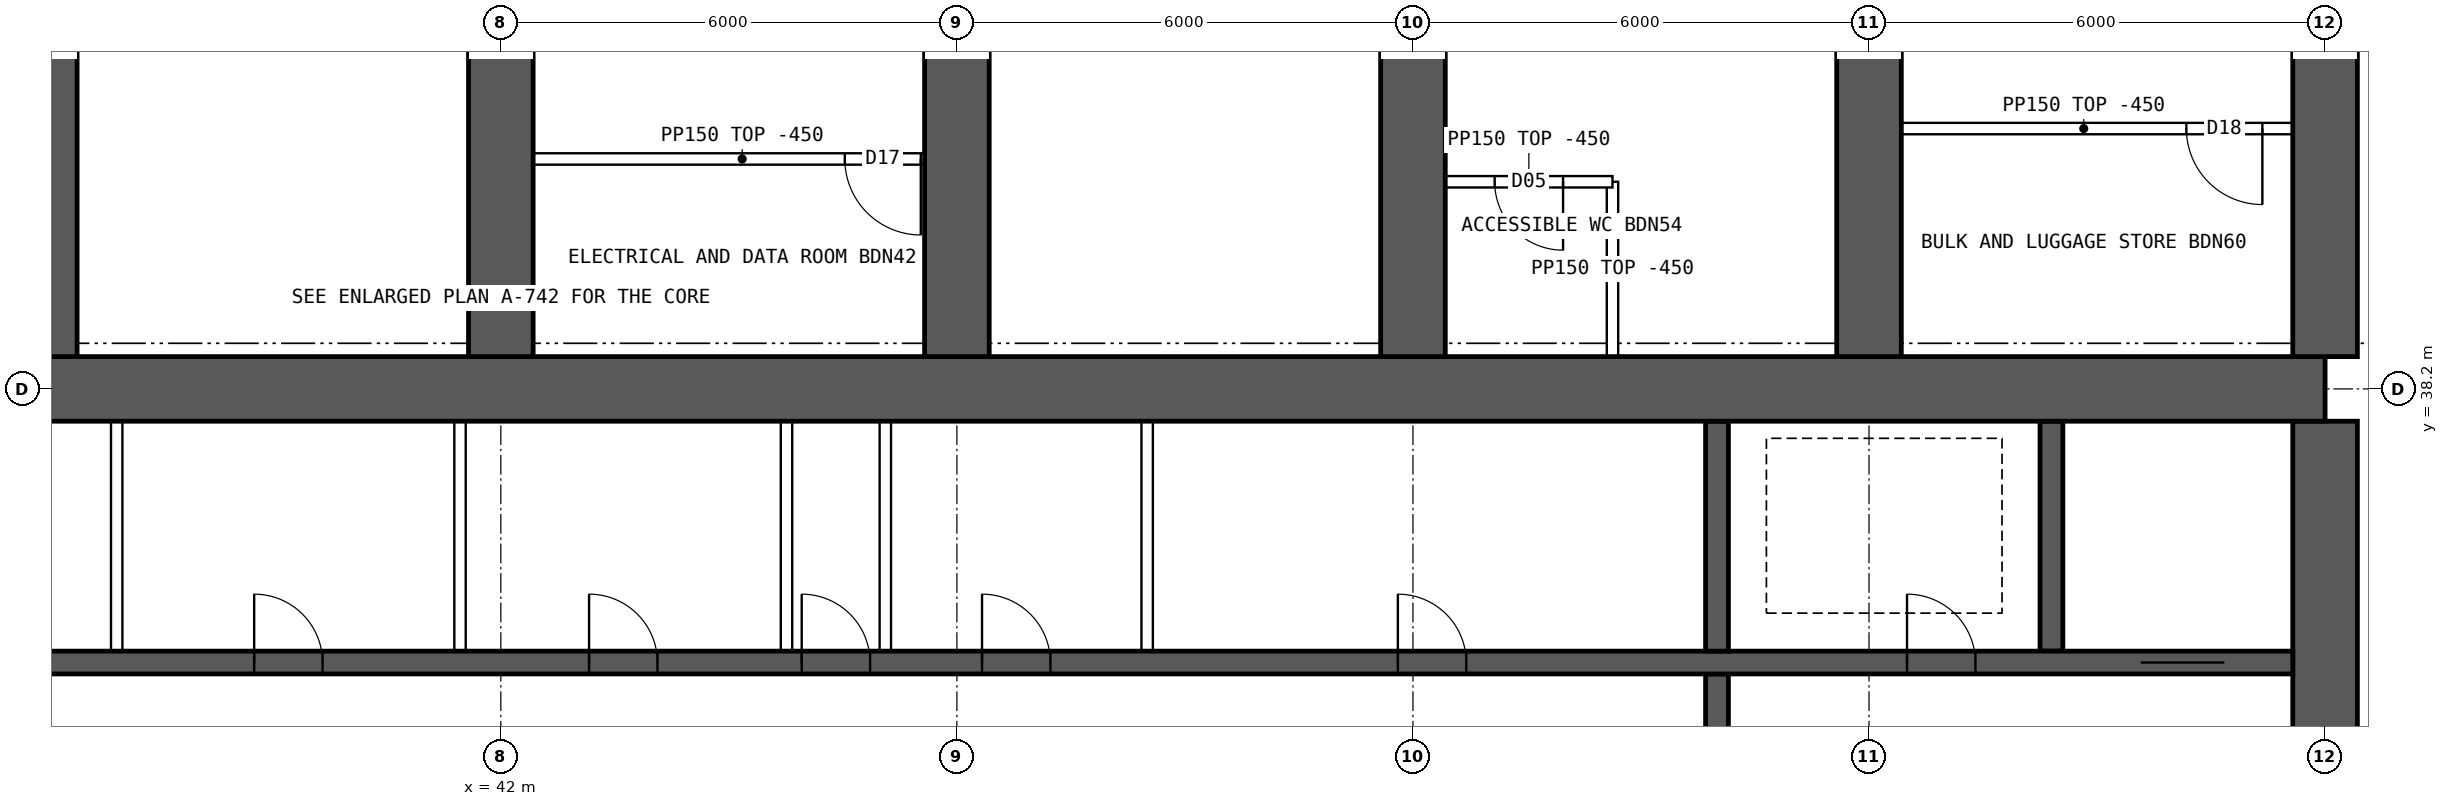
"""IFC4 building model, lengths in metres.
Left out: names, types, materials, properties, quantities, classifications, styles, units other than length and angle.
Written with IfcOpenShell. Run it as: python <this file> out.ifc"""

import sys

from ifc_helpers import new_model, si_unit, direction, frame, frame_2d, origin, place, context, subcontext, project, spatial, rectangle, extrude, element, fill, save


model = new_model("IFC4")
c1 = context("Model", 3, precision=1e-05, world=origin(), true_north=direction((0.0, 1.0)))
c2 = subcontext(c1, "Body", "Model", "MODEL_VIEW")
j1 = project(units=[si_unit("LENGTHUNIT", "METRE"), si_unit("PLANEANGLEUNIT", "RADIAN")], contexts=[c1])
p1 = place(None, origin())
s1 = spatial("IfcSite", under=j1, at=p1, CompositionType="ELEMENT")
p2 = place(p1, origin())
s2 = spatial("IfcBuilding", under=s1, at=p2, CompositionType="ELEMENT")
p3 = place(p2, frame((0.0, 0.0, 159.85)))
s3 = spatial("IfcBuildingStorey", under=s2, at=p3, CompositionType="ELEMENT", Elevation=159.85)
p4 = place(p3, frame((18.0, 38.2, 0.0), z_axis=(0.0, 0.0, 1.0), x_axis=(1.0, 0.0, 0.0)))
e1 = element("IfcWall", 1, at=p4, inside=s3, PredefinedType="SHEAR", context=c2, shape_type="SweptSolid", body=[
    extrude(rectangle(XDim=48.0, YDim=0.85, at=frame_2d((24.0, 0.0))), origin(), (0.0, 0.0, 1.0), 3.75),
])
p5 = place(p3, frame((66.0, 26.225, 0.0), z_axis=(0.0, 0.0, 1.0), x_axis=(0.0, 1.0, 0.0)))
e2 = element("IfcWall", 2, at=p5, inside=s3, PredefinedType="SHEAR", context=c2, shape_type="SweptSolid", body=[
    extrude(rectangle(XDim=11.55, YDim=0.85, at=frame_2d((5.775, 0.0))), origin(), (0.0, 0.0, 1.0), 3.75),
])
p6 = place(p5, frame((5.075, 0.0, 0.0)))
e3 = element("IfcOpeningElement", 3, at=p6, cuts=e2, PredefinedType="OPENING", context=c2, shape_type="SweptSolid", body=[
    extrude(rectangle(XDim=1.2, YDim=2.1, at=frame_2d((0.6, 1.05))), frame((0.0, 0.435, 0.0), z_axis=(0.0, -1.0, 0.0), x_axis=(1.0, 0.0, 0.0)), (0.0, 0.0, 1.0), 0.87),
])
p7 = place(p3, frame((18.425, 34.6, 0.0), z_axis=(0.0, 0.0, 1.0), x_axis=(1.0, 0.0, 0.0)))
e4 = element("IfcWall", 4, at=p7, inside=s3, PredefinedType="SHEAR", context=c2, shape_type="SweptSolid", body=[
    extrude(rectangle(XDim=47.15, YDim=0.3, at=frame_2d((23.575, 0.0))), origin(), (0.0, 0.0, 1.0), 3.75),
])
p8 = place(p7, frame((0.9, 0.0, 0.0)))
e5 = element("IfcOpeningElement", 5, at=p8, cuts=e4, PredefinedType="OPENING", context=c2, shape_type="SweptSolid", body=[
    extrude(rectangle(XDim=1.1, YDim=2.1, at=frame_2d((0.55, 1.05))), frame((0.0, 0.16, 0.0), z_axis=(0.0, -1.0, 0.0), x_axis=(1.0, 0.0, 0.0)), (0.0, 0.0, 1.0), 0.32),
])
p9 = place(p7, frame((45.15, 0.0, 0.0)))
e6 = element("IfcOpeningElement", 6, at=p9, cuts=e4, PredefinedType="OPENING", context=c2, shape_type="SweptSolid", body=[
    extrude(rectangle(XDim=1.1, YDim=2.1, at=frame_2d((0.55, 1.05))), frame((0.0, 0.16, 0.0), z_axis=(0.0, -1.0, 0.0), x_axis=(1.0, 0.0, 0.0)), (0.0, 0.0, 1.0), 0.32),
])
p10 = place(p7, frame((4.175, 0.0, 0.0)))
e7 = element("IfcOpeningElement", 7, at=p10, cuts=e4, PredefinedType="OPENING", context=c2, shape_type="SweptSolid", body=[
    extrude(rectangle(XDim=0.9, YDim=2.1, at=frame_2d((0.45, 1.05))), frame((0.0, 0.16, 0.0), z_axis=(0.0, -1.0, 0.0), x_axis=(1.0, 0.0, 0.0)), (0.0, 0.0, 1.0), 0.32),
])
p11 = place(p7, frame((42.075, 0.0, 0.0)))
e8 = element("IfcOpeningElement", 8, at=p11, cuts=e4, PredefinedType="OPENING", context=c2, shape_type="SweptSolid", body=[
    extrude(rectangle(XDim=0.9, YDim=2.1, at=frame_2d((0.45, 1.05))), frame((0.0, 0.16, 0.0), z_axis=(0.0, -1.0, 0.0), x_axis=(1.0, 0.0, 0.0)), (0.0, 0.0, 1.0), 0.32),
])
p12 = place(p7, frame((8.95, 0.0, 0.0)))
e9 = element("IfcOpeningElement", 9, at=p12, cuts=e4, PredefinedType="OPENING", context=c2, shape_type="SweptSolid", body=[
    extrude(rectangle(XDim=0.9, YDim=2.1, at=frame_2d((0.45, 1.05))), frame((0.0, 0.16, 0.0), z_axis=(0.0, -1.0, 0.0), x_axis=(1.0, 0.0, 0.0)), (0.0, 0.0, 1.0), 0.32),
])
p13 = place(p7, frame((12.924, 0.0, 0.0)))
e10 = element("IfcOpeningElement", 10, at=p13, cuts=e4, PredefinedType="OPENING", context=c2, shape_type="SweptSolid", body=[
    extrude(rectangle(XDim=0.9, YDim=2.1, at=frame_2d((0.45, 1.05))), frame((0.0, 0.16, 0.0), z_axis=(0.0, -1.0, 0.0), x_axis=(1.0, 0.0, 0.0)), (0.0, 0.0, 1.0), 0.32),
])
p14 = place(p7, frame((16.571, 0.0, 0.0)))
e11 = element("IfcOpeningElement", 11, at=p14, cuts=e4, PredefinedType="OPENING", context=c2, shape_type="SweptSolid", body=[
    extrude(rectangle(XDim=0.9, YDim=2.1, at=frame_2d((0.45, 1.05))), frame((0.0, 0.16, 0.0), z_axis=(0.0, -1.0, 0.0), x_axis=(1.0, 0.0, 0.0)), (0.0, 0.0, 1.0), 0.32),
])
p15 = place(p7, frame((20.33, 0.0, 0.0)))
e12 = element("IfcOpeningElement", 12, at=p15, cuts=e4, PredefinedType="OPENING", context=c2, shape_type="SweptSolid", body=[
    extrude(rectangle(XDim=0.9, YDim=2.1, at=frame_2d((0.45, 1.05))), frame((0.0, 0.16, 0.0), z_axis=(0.0, -1.0, 0.0), x_axis=(1.0, 0.0, 0.0)), (0.0, 0.0, 1.0), 0.32),
])
p16 = place(p7, frame((24.736, 0.0, 0.0)))
e13 = element("IfcOpeningElement", 13, at=p16, cuts=e4, PredefinedType="OPENING", context=c2, shape_type="SweptSolid", body=[
    extrude(rectangle(XDim=0.9, YDim=2.1, at=frame_2d((0.45, 1.05))), frame((0.0, 0.16, 0.0), z_axis=(0.0, -1.0, 0.0), x_axis=(1.0, 0.0, 0.0)), (0.0, 0.0, 1.0), 0.32),
])
p17 = place(p7, frame((27.533, 0.0, 0.0)))
e14 = element("IfcOpeningElement", 14, at=p17, cuts=e4, PredefinedType="OPENING", context=c2, shape_type="SweptSolid", body=[
    extrude(rectangle(XDim=0.9, YDim=2.1, at=frame_2d((0.45, 1.05))), frame((0.0, 0.16, 0.0), z_axis=(0.0, -1.0, 0.0), x_axis=(1.0, 0.0, 0.0)), (0.0, 0.0, 1.0), 0.32),
])
p18 = place(p7, frame((29.906, 0.0, 0.0)))
e15 = element("IfcOpeningElement", 15, at=p18, cuts=e4, PredefinedType="OPENING", context=c2, shape_type="SweptSolid", body=[
    extrude(rectangle(XDim=0.9, YDim=2.1, at=frame_2d((0.45, 1.05))), frame((0.0, 0.16, 0.0), z_axis=(0.0, -1.0, 0.0), x_axis=(1.0, 0.0, 0.0)), (0.0, 0.0, 1.0), 0.32),
])
p19 = place(p7, frame((35.376, 0.0, 0.0)))
e16 = element("IfcOpeningElement", 16, at=p19, cuts=e4, PredefinedType="OPENING", context=c2, shape_type="SweptSolid", body=[
    extrude(rectangle(XDim=0.9, YDim=2.1, at=frame_2d((0.45, 1.05))), frame((0.0, 0.16, 0.0), z_axis=(0.0, -1.0, 0.0), x_axis=(1.0, 0.0, 0.0)), (0.0, 0.0, 1.0), 0.32),
])
p20 = place(p3, frame((58.0, 30.55, 0.0), z_axis=(0.0, 0.0, 1.0), x_axis=(0.0, 1.0, 0.0)))
e17 = element("IfcWall", 17, at=p20, inside=s3, PredefinedType="SHEAR", context=c2, shape_type="SweptSolid", body=[
    extrude(rectangle(XDim=3.9, YDim=0.3, at=frame_2d((1.95, 0.0))), origin(), (0.0, 0.0, 1.0), 3.75),
])
p21 = place(p20, frame((1.4, 0.0, 0.0)))
e18 = element("IfcOpeningElement", 18, at=p21, cuts=e17, PredefinedType="OPENING", context=c2, shape_type="SweptSolid", body=[
    extrude(rectangle(XDim=1.2, YDim=2.1, at=frame_2d((0.6, 1.05))), frame((0.0, 0.16, 0.0), z_axis=(0.0, -1.0, 0.0), x_axis=(1.0, 0.0, 0.0)), (0.0, 0.0, 1.0), 0.32),
])
for number, where, z_axis, x_axis in (
    (19, (62.4, 34.75, 0.0), (0.0, 0.0, 1.0), (0.0, 1.0, 0.0)),
    (20, (58.0, 34.75, 0.0), (0.0, 0.0, 1.0), (0.0, 1.0, 0.0)),
):
    element("IfcWall", number, at=place(p3, frame(where, z_axis=z_axis, x_axis=x_axis)), inside=s3, PredefinedType="SHEAR", context=c2, shape_type="SweptSolid", body=[
        extrude(rectangle(XDim=3.025, YDim=0.3, at=frame_2d((1.512, 0.0))), origin(), (0.0, 0.0, 1.0), 3.75),
    ])
for number, where, z_axis, x_axis in (
    (21, (36.0, 38.625, 0.0), (0.0, 0.0, 1.0), (0.0, 1.0, 0.0)),
    (22, (42.0, 38.625, 0.0), (0.0, 0.0, 1.0), (0.0, 1.0, 0.0)),
    (23, (48.0, 38.625, 0.0), (0.0, 0.0, 1.0), (0.0, 1.0, 0.0)),
    (24, (54.0, 38.625, 0.0), (0.0, 0.0, 1.0), (0.0, 1.0, 0.0)),
    (25, (60.0, 38.625, 0.0), (0.0, 0.0, 1.0), (0.0, 1.0, 0.0)),
    (26, (66.0, 38.625, 0.0), (0.0, 0.0, 1.0), (0.0, 1.0, 0.0)),
):
    element("IfcWall", number, at=place(p3, frame(where, z_axis=z_axis, x_axis=x_axis)), inside=s3, PredefinedType="SHEAR", context=c2, shape_type="SweptSolid", body=[
        extrude(rectangle(XDim=8.175, YDim=0.85, at=frame_2d((4.087, 0.0))), origin(), (0.0, 0.0, 1.0), 3.75),
    ])
for number, where, z_axis, x_axis in (
    (27, (36.946, 34.75, 0.0), (0.0, 0.0, 1.0), (0.0, 1.0, 0.0)),
    (28, (41.463, 34.75, 0.0), (0.0, 0.0, 1.0), (0.0, 1.0, 0.0)),
    (29, (45.758, 34.75, 0.0), (0.0, 0.0, 1.0), (0.0, 1.0, 0.0)),
    (30, (47.058, 34.75, 0.0), (0.0, 0.0, 1.0), (0.0, 1.0, 0.0)),
    (31, (50.503, 34.75, 0.0), (0.0, 0.0, 1.0), (0.0, 1.0, 0.0)),
):
    element("IfcWall", number, at=place(p3, frame(where, z_axis=z_axis, x_axis=x_axis)), inside=s3, PredefinedType="SOLIDWALL", context=c2, shape_type="SweptSolid", body=[
        extrude(rectangle(XDim=3.025, YDim=0.15, at=frame_2d((1.512, 0.0))), origin(), (0.0, 0.0, 1.0), 3.3),
    ])
p22 = place(p3, frame((47.925, 41.225, 0.0), z_axis=(0.0, 0.0, 1.0), x_axis=(-1.0, 0.0, 0.0)))
e32 = element("IfcWall", 32, at=p22, inside=s3, PredefinedType="PARTITIONING", context=c2, shape_type="SweptSolid", body=[
    extrude(rectangle(XDim=5.5, YDim=0.15, at=frame_2d((2.75, 0.0))), origin(), (0.0, 0.0, 1.0), 3.3),
])
p23 = place(p22, frame((0.4, 0.0, 0.0)))
e33 = element("IfcOpeningElement", 33, at=p23, cuts=e32, PredefinedType="OPENING", context=c2, shape_type="SweptSolid", body=[
    extrude(rectangle(XDim=1.0, YDim=2.1, at=frame_2d((0.5, 1.05))), frame((0.0, 0.085, 0.0), z_axis=(0.0, -1.0, 0.0), x_axis=(1.0, 0.0, 0.0)), (0.0, 0.0, 1.0), 0.17),
])
p24 = place(p3, frame((56.625, 40.925, 0.0), z_axis=(0.0, 0.0, 1.0), x_axis=(0.0, -1.0, 0.0)))
e34 = element("IfcWall", 34, at=p24, inside=s3, PredefinedType="PARTITIONING", context=c2, shape_type="SweptSolid", body=[
    extrude(rectangle(XDim=2.3, YDim=0.15, at=frame_2d((1.15, 0.0))), origin(), (0.0, 0.0, 1.0), 3.3),
])
p25 = place(p3, frame((56.625, 40.925, 0.0), z_axis=(0.0, 0.0, 1.0), x_axis=(-1.0, 0.0, 0.0)))
e35 = element("IfcWall", 35, at=p25, inside=s3, PredefinedType="PARTITIONING", context=c2, shape_type="SweptSolid", body=[
    extrude(rectangle(XDim=2.2, YDim=0.15, at=frame_2d((1.1, 0.0))), origin(), (0.0, 0.0, 1.0), 3.3),
])
p26 = place(p25, frame((0.65, 0.0, 0.0)))
e36 = element("IfcOpeningElement", 36, at=p26, cuts=e35, PredefinedType="OPENING", context=c2, shape_type="SweptSolid", body=[
    extrude(rectangle(XDim=0.9, YDim=2.1, at=frame_2d((0.45, 1.05))), frame((0.0, 0.085, 0.0), z_axis=(0.0, -1.0, 0.0), x_axis=(1.0, 0.0, 0.0)), (0.0, 0.0, 1.0), 0.17),
])
p27 = place(p3, frame((65.575, 41.625, 0.0), z_axis=(0.0, 0.0, 1.0), x_axis=(-1.0, 0.0, 0.0)))
e37 = element("IfcWall", 37, at=p27, inside=s3, PredefinedType="PARTITIONING", context=c2, shape_type="SweptSolid", body=[
    extrude(rectangle(XDim=5.5, YDim=0.15, at=frame_2d((2.75, 0.0))), origin(), (0.0, 0.0, 1.0), 3.3),
])
p28 = place(p27, frame((0.4, 0.0, 0.0)))
e38 = element("IfcOpeningElement", 38, at=p28, cuts=e37, PredefinedType="OPENING", context=c2, shape_type="SweptSolid", body=[
    extrude(rectangle(XDim=1.0, YDim=2.1, at=frame_2d((0.5, 1.05))), frame((0.0, 0.085, 0.0), z_axis=(0.0, -1.0, 0.0), x_axis=(1.0, 0.0, 0.0)), (0.0, 0.0, 1.0), 0.17),
])
p29 = place(p9, origin())
e39 = element("IfcDoor", 39, at=p29, inside=s3, OperationType="DOUBLE_DOOR_SLIDING", PredefinedType="DOOR", context=c2, shape_type="SweptSolid", body=[
    extrude(rectangle(XDim=1.1, YDim=2.1, at=frame_2d((0.55, 1.05))), frame((0.0, 0.025, 0.0), z_axis=(0.0, -1.0, 0.0), x_axis=(1.0, 0.0, 0.0)), (0.0, 0.0, 1.0), 0.05),
])
fill(e6, e39)
p30 = place(p11, origin())
e40 = element("IfcDoor", 40, at=p30, inside=s3, OperationType="SINGLE_SWING_LEFT", PredefinedType="DOOR", context=c2, shape_type="SweptSolid", body=[
    extrude(rectangle(XDim=0.9, YDim=2.1, at=frame_2d((0.45, 1.05))), frame((0.0, 0.025, 0.0), z_axis=(0.0, -1.0, 0.0), x_axis=(1.0, 0.0, 0.0)), (0.0, 0.0, 1.0), 0.05),
])
fill(e8, e40)
p31 = place(p15, origin())
e41 = element("IfcDoor", 41, at=p31, inside=s3, OperationType="SINGLE_SWING_LEFT", PredefinedType="DOOR", context=c2, shape_type="SweptSolid", body=[
    extrude(rectangle(XDim=0.9, YDim=2.1, at=frame_2d((0.45, 1.05))), frame((0.0, 0.025, 0.0), z_axis=(0.0, -1.0, 0.0), x_axis=(1.0, 0.0, 0.0)), (0.0, 0.0, 1.0), 0.05),
])
fill(e12, e41)
p32 = place(p16, origin())
e42 = element("IfcDoor", 42, at=p32, inside=s3, OperationType="SINGLE_SWING_LEFT", PredefinedType="DOOR", context=c2, shape_type="SweptSolid", body=[
    extrude(rectangle(XDim=0.9, YDim=2.1, at=frame_2d((0.45, 1.05))), frame((0.0, 0.025, 0.0), z_axis=(0.0, -1.0, 0.0), x_axis=(1.0, 0.0, 0.0)), (0.0, 0.0, 1.0), 0.05),
])
fill(e13, e42)
p33 = place(p17, origin())
e43 = element("IfcDoor", 43, at=p33, inside=s3, OperationType="SINGLE_SWING_LEFT", PredefinedType="DOOR", context=c2, shape_type="SweptSolid", body=[
    extrude(rectangle(XDim=0.9, YDim=2.1, at=frame_2d((0.45, 1.05))), frame((0.0, 0.025, 0.0), z_axis=(0.0, -1.0, 0.0), x_axis=(1.0, 0.0, 0.0)), (0.0, 0.0, 1.0), 0.05),
])
fill(e14, e43)
p34 = place(p18, origin())
e44 = element("IfcDoor", 44, at=p34, inside=s3, OperationType="SINGLE_SWING_LEFT", PredefinedType="DOOR", context=c2, shape_type="SweptSolid", body=[
    extrude(rectangle(XDim=0.9, YDim=2.1, at=frame_2d((0.45, 1.05))), frame((0.0, 0.025, 0.0), z_axis=(0.0, -1.0, 0.0), x_axis=(1.0, 0.0, 0.0)), (0.0, 0.0, 1.0), 0.05),
])
fill(e15, e44)
p35 = place(p19, origin())
e45 = element("IfcDoor", 45, at=p35, inside=s3, OperationType="SINGLE_SWING_LEFT", PredefinedType="DOOR", context=c2, shape_type="SweptSolid", body=[
    extrude(rectangle(XDim=0.9, YDim=2.1, at=frame_2d((0.45, 1.05))), frame((0.0, 0.025, 0.0), z_axis=(0.0, -1.0, 0.0), x_axis=(1.0, 0.0, 0.0)), (0.0, 0.0, 1.0), 0.05),
])
fill(e16, e45)
p36 = place(p23, origin())
e46 = element("IfcDoor", 46, at=p36, inside=s3, OperationType="SINGLE_SWING_LEFT", PredefinedType="DOOR", context=c2, shape_type="SweptSolid", body=[
    extrude(rectangle(XDim=1.0, YDim=2.1, at=frame_2d((0.5, 1.05))), frame((0.0, 0.025, 0.0), z_axis=(0.0, -1.0, 0.0), x_axis=(1.0, 0.0, 0.0)), (0.0, 0.0, 1.0), 0.05),
])
fill(e33, e46)
p37 = place(p26, origin())
e47 = element("IfcDoor", 47, at=p37, inside=s3, OperationType="SINGLE_SWING_LEFT", PredefinedType="DOOR", context=c2, shape_type="SweptSolid", body=[
    extrude(rectangle(XDim=0.9, YDim=2.1, at=frame_2d((0.45, 1.05))), frame((0.0, 0.025, 0.0), z_axis=(0.0, -1.0, 0.0), x_axis=(1.0, 0.0, 0.0)), (0.0, 0.0, 1.0), 0.05),
])
fill(e36, e47)
p38 = place(p28, origin())
e48 = element("IfcDoor", 48, at=p38, inside=s3, OperationType="SINGLE_SWING_LEFT", PredefinedType="DOOR", context=c2, shape_type="SweptSolid", body=[
    extrude(rectangle(XDim=1.0, YDim=2.1, at=frame_2d((0.5, 1.05))), frame((0.0, 0.025, 0.0), z_axis=(0.0, -1.0, 0.0), x_axis=(1.0, 0.0, 0.0)), (0.0, 0.0, 1.0), 0.05),
])
fill(e38, e48)
save(model, sys.argv[1])
